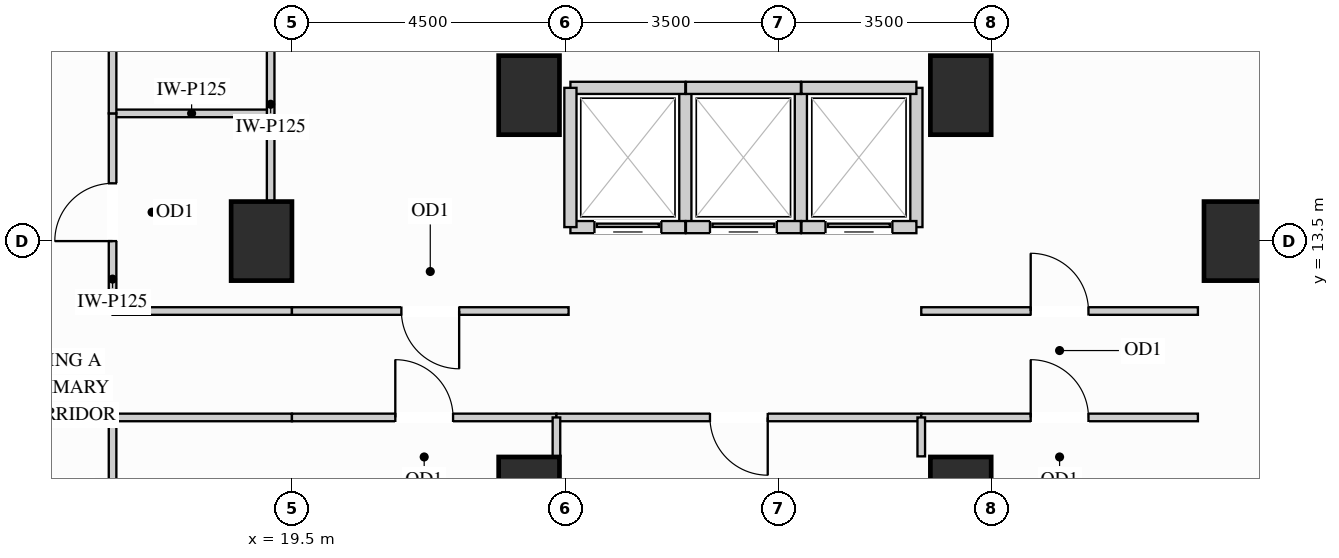
"""IFC4 building model, lengths in metres.
Left out: names, types, materials, properties, quantities, classifications, styles, units other than length and angle.
Written with IfcOpenShell. Run it as: python <this file> out.ifc"""

import sys

from ifc_helpers import new_model, si_unit, direction, frame, frame_2d, origin, origin_2d, place, context, subcontext, project, spatial, rectangle, extrude, source, transform, mapped, element, fill, save


model = new_model("IFC4")
c1 = context("Model", 3, precision=1e-05, world=origin(), true_north=direction((0.0, 1.0)))
c2 = subcontext(c1, "Body", "Model", "MODEL_VIEW")
j1 = project(units=[si_unit("LENGTHUNIT", "METRE"), si_unit("PLANEANGLEUNIT", "RADIAN")], contexts=[c1])
p1 = place(None, origin())
s1 = spatial("IfcSite", under=j1, at=p1, CompositionType="ELEMENT")
p2 = place(p1, origin())
s2 = spatial("IfcBuilding", under=s1, at=p2, CompositionType="ELEMENT")
p3 = place(p2, frame((0.0, 0.0, 29.7)))
s3 = spatial("IfcBuildingStorey", under=s2, at=p3, CompositionType="ELEMENT", Elevation=29.7)
m1 = source(origin(), c2, "Body", "SweptSolid", [
    extrude(rectangle(XDim=1.0, YDim=1.3, at=origin_2d()), origin(), (0.0, 0.0, 1.0), 3.38),
])
for number, where, z_axis, x_axis in (
    (1, (19.0, 13.5, 0.0), (0.0, 0.0, 1.0), (1.0, 0.0, 0.0)),
    (2, (35.0, 13.5, 0.0), (0.0, 0.0, 1.0), (1.0, 0.0, 0.0)),
    (3, (23.4, 15.9, 0.0), (0.0, 0.0, 1.0), (1.0, 0.0, 0.0)),
    (4, (23.4, 9.3, 0.0), (0.0, 0.0, 1.0), (1.0, 0.0, 0.0)),
    (5, (30.5, 15.9, 0.0), (0.0, 0.0, 1.0), (1.0, 0.0, 0.0)),
    (6, (30.5, 9.3, 0.0), (0.0, 0.0, 1.0), (1.0, 0.0, 0.0)),
):
    element("IfcColumn", number, at=place(p3, frame(where, z_axis=z_axis, x_axis=x_axis)), inside=s3, PredefinedType="COLUMN", context=c2, shape_type="MappedRepresentation", body=[
        mapped(m1, transform((0.0, 0.0, 0.0), x_axis=(1.0, 0.0, 0.0), y_axis=(0.0, 1.0, 0.0), z_axis=(0.0, 0.0, 1.0))),
    ])
m2 = source(origin(), c2, "Body", "SweptSolid", [
    extrude(rectangle(XDim=2.6, YDim=0.125, at=frame_2d((1.3, 0.0))), origin(), (0.0, 0.0, 1.0), 3.365),
])
p4 = place(p3, frame((16.55, 15.6, 0.0), z_axis=(0.0, 0.0, 1.0), x_axis=(1.0, 0.0, 0.0)))
e7 = element("IfcWall", 7, at=p4, inside=s3, PredefinedType="PARTITIONING", context=c2, shape_type="MappedRepresentation", body=[
    mapped(m2, transform((0.0, 0.0, 0.0), x_axis=(1.0, 0.0, 0.0), y_axis=(0.0, 1.0, 0.0), z_axis=(0.0, 0.0, 1.0))),
])
m3 = source(origin(), c2, "Body", "SweptSolid", [
    extrude(rectangle(XDim=3.18, YDim=0.125, at=frame_2d((1.59, 0.0))), origin(), (0.0, 0.0, 1.0), 2.67),
])
p5 = place(p3, frame((19.15, 14.16, 0.0), z_axis=(0.0, 0.0, 1.0), x_axis=(0.0, 1.0, 0.0)))
e8 = element("IfcWall", 8, at=p5, inside=s3, PredefinedType="PARTITIONING", context=c2, shape_type="MappedRepresentation", body=[
    mapped(m3, transform((0.0, 0.0, 0.0), x_axis=(1.0, 0.0, 0.0), y_axis=(0.0, 1.0, 0.0), z_axis=(0.0, 0.0, 1.0))),
])
p6 = place(p3, frame((16.55, 12.35, 0.0), z_axis=(0.0, 0.0, 1.0), x_axis=(0.0, 1.0, 0.0)))
e9 = element("IfcWall", 9, at=p6, inside=s3, PredefinedType="PARTITIONING", context=c2, shape_type="SweptSolid", body=[
    extrude(rectangle(XDim=3.25, YDim=0.125, at=frame_2d((1.625, 0.0))), origin(), (0.0, 0.0, 1.0), 3.365),
])
p7 = place(p6, frame((1.15, 0.0, 0.0)))
e10 = element("IfcOpeningElement", 10, at=p7, cuts=e9, PredefinedType="OPENING", context=c2, shape_type="SweptSolid", body=[
    extrude(rectangle(XDim=0.95, YDim=2.15, at=frame_2d((0.475, 1.075))), frame((0.0, 0.073, 0.0), z_axis=(0.0, -1.0, 0.0), x_axis=(1.0, 0.0, 0.0)), (0.0, 0.0, 1.0), 0.145),
])
p8 = place(p3, frame((16.55, 15.6, 0.0), z_axis=(0.0, 0.0, 1.0), x_axis=(0.0, 1.0, 0.0)))
e11 = element("IfcWall", 11, at=p8, inside=s3, PredefinedType="PARTITIONING", context=c2, shape_type="SweptSolid", body=[
    extrude(rectangle(XDim=7.75, YDim=0.125, at=frame_2d((3.875, 0.0))), origin(), (0.0, 0.0, 1.0), 3.365),
])
p9 = place(p8, frame((3.4, 0.0, 0.0)))
e12 = element("IfcOpeningElement", 12, at=p9, cuts=e11, PredefinedType="OPENING", context=c2, shape_type="SweptSolid", body=[
    extrude(rectangle(XDim=0.95, YDim=2.15, at=frame_2d((0.475, 1.075))), frame((0.0, 0.073, 0.0), z_axis=(0.0, -1.0, 0.0), x_axis=(1.0, 0.0, 0.0)), (0.0, 0.0, 1.0), 0.145),
])
p10 = place(p3, frame((16.55, 6.2, 0.0), z_axis=(0.0, 0.0, 1.0), x_axis=(0.0, 1.0, 0.0)))
e13 = element("IfcWall", 13, at=p10, inside=s3, PredefinedType="PARTITIONING", context=c2, shape_type="SweptSolid", body=[
    extrude(rectangle(XDim=4.4, YDim=0.125, at=frame_2d((2.2, 0.0))), origin(), (0.0, 0.0, 1.0), 3.365),
])
p11 = place(p10, frame((1.725, 0.0, 0.0)))
e14 = element("IfcOpeningElement", 14, at=p11, cuts=e13, PredefinedType="OPENING", context=c2, shape_type="SweptSolid", body=[
    extrude(rectangle(XDim=0.95, YDim=2.15, at=frame_2d((0.475, 1.075))), frame((0.0, 0.073, 0.0), z_axis=(0.0, -1.0, 0.0), x_axis=(1.0, 0.0, 0.0)), (0.0, 0.0, 1.0), 0.145),
])
p12 = place(p3, frame((29.85, 12.35, 0.0), z_axis=(0.0, 0.0, 1.0), x_axis=(1.0, 0.0, 0.0)))
e15 = element("IfcWall", 15, at=p12, inside=s3, PredefinedType="PARTITIONING", context=c2, shape_type="SweptSolid", body=[
    extrude(rectangle(XDim=4.55, YDim=0.125, at=frame_2d((2.275, 0.0))), origin(), (0.0, 0.0, 1.0), 3.365),
])
p13 = place(p12, frame((1.8, 0.0, 0.0)))
e16 = element("IfcOpeningElement", 16, at=p13, cuts=e15, PredefinedType="OPENING", context=c2, shape_type="SweptSolid", body=[
    extrude(rectangle(XDim=0.95, YDim=2.15, at=frame_2d((0.475, 1.075))), frame((0.0, 0.073, 0.0), z_axis=(0.0, -1.0, 0.0), x_axis=(1.0, 0.0, 0.0)), (0.0, 0.0, 1.0), 0.145),
])
m4 = source(origin(), c2, "Body", "SweptSolid", [
    extrude(rectangle(XDim=2.95, YDim=0.125, at=frame_2d((1.475, 0.0))), origin(), (0.0, 0.0, 1.0), 3.365),
])
p14 = place(p3, frame((16.55, 12.35, 0.0), z_axis=(0.0, 0.0, 1.0), x_axis=(1.0, 0.0, 0.0)))
e17 = element("IfcWall", 17, at=p14, inside=s3, PredefinedType="PARTITIONING", context=c2, shape_type="MappedRepresentation", body=[
    mapped(m4, transform((0.0, 0.0, 0.0), x_axis=(1.0, 0.0, 0.0), y_axis=(0.0, 1.0, 0.0), z_axis=(0.0, 0.0, 1.0))),
])
p15 = place(p3, frame((19.5, 12.35, 0.0), z_axis=(0.0, 0.0, 1.0), x_axis=(1.0, 0.0, 0.0)))
e18 = element("IfcWall", 18, at=p15, inside=s3, PredefinedType="PARTITIONING", context=c2, shape_type="SweptSolid", body=[
    extrude(rectangle(XDim=4.55, YDim=0.125, at=frame_2d((2.275, 0.0))), origin(), (0.0, 0.0, 1.0), 3.365),
])
p16 = place(p15, frame((1.8, 0.0, 0.0)))
e19 = element("IfcOpeningElement", 19, at=p16, cuts=e18, PredefinedType="OPENING", context=c2, shape_type="SweptSolid", body=[
    extrude(rectangle(XDim=0.95, YDim=2.15, at=frame_2d((0.475, 1.075))), frame((0.0, 0.073, 0.0), z_axis=(0.0, -1.0, 0.0), x_axis=(1.0, 0.0, 0.0)), (0.0, 0.0, 1.0), 0.145),
])
p17 = place(p3, frame((16.55, 10.6, 0.0), z_axis=(0.0, 0.0, 1.0), x_axis=(1.0, 0.0, 0.0)))
e20 = element("IfcWall", 20, at=p17, inside=s3, PredefinedType="PARTITIONING", context=c2, shape_type="MappedRepresentation", body=[
    mapped(m4, transform((0.0, 0.0, 0.0), x_axis=(1.0, 0.0, 0.0), y_axis=(0.0, 1.0, 0.0), z_axis=(0.0, 0.0, 1.0))),
])
p18 = place(p3, frame((19.5, 10.6, 0.0), z_axis=(0.0, 0.0, 1.0), x_axis=(1.0, 0.0, 0.0)))
e21 = element("IfcWall", 21, at=p18, inside=s3, PredefinedType="PARTITIONING", context=c2, shape_type="SweptSolid", body=[
    extrude(rectangle(XDim=4.35, YDim=0.125, at=frame_2d((2.175, 0.0))), origin(), (0.0, 0.0, 1.0), 3.365),
])
p19 = place(p18, frame((1.7, 0.0, 0.0)))
e22 = element("IfcOpeningElement", 22, at=p19, cuts=e21, PredefinedType="OPENING", context=c2, shape_type="SweptSolid", body=[
    extrude(rectangle(XDim=0.95, YDim=2.15, at=frame_2d((0.475, 1.075))), frame((0.0, 0.073, 0.0), z_axis=(0.0, -1.0, 0.0), x_axis=(1.0, 0.0, 0.0)), (0.0, 0.0, 1.0), 0.145),
])
p20 = place(p3, frame((23.85, 10.6, 0.0), z_axis=(0.0, 0.0, 1.0), x_axis=(1.0, 0.0, 0.0)))
e23 = element("IfcWall", 23, at=p20, inside=s3, PredefinedType="PARTITIONING", context=c2, shape_type="SweptSolid", body=[
    extrude(rectangle(XDim=6.0, YDim=0.125, at=frame_2d((3.0, 0.0))), origin(), (0.0, 0.0, 1.0), 3.365),
])
p21 = place(p20, frame((2.525, 0.0, 0.0)))
e24 = element("IfcOpeningElement", 24, at=p21, cuts=e23, PredefinedType="OPENING", context=c2, shape_type="SweptSolid", body=[
    extrude(rectangle(XDim=0.95, YDim=2.15, at=frame_2d((0.475, 1.075))), frame((0.0, 0.073, 0.0), z_axis=(0.0, -1.0, 0.0), x_axis=(1.0, 0.0, 0.0)), (0.0, 0.0, 1.0), 0.145),
])
p22 = place(p3, frame((29.85, 10.6, 0.0), z_axis=(0.0, 0.0, 1.0), x_axis=(1.0, 0.0, 0.0)))
e25 = element("IfcWall", 25, at=p22, inside=s3, PredefinedType="PARTITIONING", context=c2, shape_type="SweptSolid", body=[
    extrude(rectangle(XDim=4.55, YDim=0.125, at=frame_2d((2.275, 0.0))), origin(), (0.0, 0.0, 1.0), 3.365),
])
p23 = place(p22, frame((1.8, 0.0, 0.0)))
e26 = element("IfcOpeningElement", 26, at=p23, cuts=e25, PredefinedType="OPENING", context=c2, shape_type="SweptSolid", body=[
    extrude(rectangle(XDim=0.95, YDim=2.15, at=frame_2d((0.475, 1.075))), frame((0.0, 0.073, 0.0), z_axis=(0.0, -1.0, 0.0), x_axis=(1.0, 0.0, 0.0)), (0.0, 0.0, 1.0), 0.145),
])
m5 = source(origin(), c2, "Body", "SweptSolid", [
    extrude(rectangle(XDim=0.64, YDim=0.125, at=frame_2d((0.32, 0.0))), origin(), (0.0, 0.0, 1.0), 3.365),
])
for number, where, z_axis, x_axis in (
    (27, (23.85, 9.96, 0.0), (0.0, 0.0, 1.0), (0.0, 1.0, 0.0)),
    (28, (29.85, 9.96, 0.0), (0.0, 0.0, 1.0), (0.0, 1.0, 0.0)),
):
    element("IfcWall", number, at=place(p3, frame(where, z_axis=z_axis, x_axis=x_axis)), inside=s3, PredefinedType="PARTITIONING", context=c2, shape_type="MappedRepresentation", body=[
        mapped(m5, transform((0.0, 0.0, 0.0), x_axis=(1.0, 0.0, 0.0), y_axis=(0.0, 1.0, 0.0), z_axis=(0.0, 0.0, 1.0))),
    ])
m6 = source(origin(), c2, "Body", "SweptSolid", [
    extrude(rectangle(XDim=2.29, YDim=0.2, at=frame_2d((1.145, 0.0))), origin(), (0.0, 0.0, 1.0), 3.365),
])
p24 = place(p3, frame((25.97, 13.73, 0.0), z_axis=(0.0, 0.0, 1.0), x_axis=(0.0, 1.0, 0.0)))
e29 = element("IfcWall", 29, at=p24, inside=s3, PredefinedType="PARTITIONING", context=c2, shape_type="MappedRepresentation", body=[
    mapped(m6, transform((0.0, 0.0, 0.0), x_axis=(1.0, 0.0, 0.0), y_axis=(0.0, 1.0, 0.0), z_axis=(0.0, 0.0, 1.0))),
])
m7 = source(origin(), c2, "Body", "SweptSolid", [
    extrude(rectangle(XDim=1.89, YDim=0.2, at=frame_2d((0.945, 0.0))), origin(), (0.0, 0.0, 1.0), 2.67),
])
p25 = place(p3, frame((24.08, 16.02, 0.0), z_axis=(0.0, 0.0, 1.0), x_axis=(1.0, 0.0, 0.0)))
e30 = element("IfcWall", 30, at=p25, inside=s3, PredefinedType="PARTITIONING", context=c2, shape_type="MappedRepresentation", body=[
    mapped(m7, transform((0.0, 0.0, 0.0), x_axis=(1.0, 0.0, 0.0), y_axis=(0.0, 1.0, 0.0), z_axis=(0.0, 0.0, 1.0))),
])
p26 = place(p3, frame((24.08, 13.73, 0.0), z_axis=(0.0, 0.0, 1.0), x_axis=(1.0, 0.0, 0.0)))
e31 = element("IfcWall", 31, at=p26, inside=s3, PredefinedType="PARTITIONING", context=c2, shape_type="SweptSolid", body=[
    extrude(rectangle(XDim=1.89, YDim=0.2, at=frame_2d((0.945, 0.0))), origin(), (0.0, 0.0, 1.0), 2.446),
])
p27 = place(p26, frame((0.395, 0.0, 0.0)))
e32 = element("IfcOpeningElement", 32, at=p27, cuts=e31, PredefinedType="OPENING", context=c2, shape_type="SweptSolid", body=[
    extrude(rectangle(XDim=1.1, YDim=2.2, at=frame_2d((0.55, 1.1))), frame((0.0, 0.11, 0.0), z_axis=(0.0, -1.0, 0.0), x_axis=(1.0, 0.0, 0.0)), (0.0, 0.0, 1.0), 0.22),
])
for number, where, z_axis, x_axis in (
    (33, (24.08, 13.73, 0.0), (0.0, 0.0, 1.0), (0.0, 1.0, 0.0)),
    (34, (27.87, 13.73, 0.0), (0.0, 0.0, 1.0), (0.0, 1.0, 0.0)),
):
    element("IfcWall", number, at=place(p3, frame(where, z_axis=z_axis, x_axis=x_axis)), inside=s3, PredefinedType="PARTITIONING", context=c2, shape_type="MappedRepresentation", body=[
        mapped(m6, transform((0.0, 0.0, 0.0), x_axis=(1.0, 0.0, 0.0), y_axis=(0.0, 1.0, 0.0), z_axis=(0.0, 0.0, 1.0))),
    ])
m8 = source(origin(), c2, "Body", "SweptSolid", [
    extrude(rectangle(XDim=1.89, YDim=0.2, at=frame_2d((0.945, 0.0))), origin(), (0.0, 0.0, 1.0), 2.67),
])
p28 = place(p3, frame((25.98, 16.02, 0.0), z_axis=(0.0, 0.0, 1.0), x_axis=(1.0, 0.0, 0.0)))
e35 = element("IfcWall", 35, at=p28, inside=s3, PredefinedType="PARTITIONING", context=c2, shape_type="MappedRepresentation", body=[
    mapped(m8, transform((0.0, 0.0, 0.0), x_axis=(1.0, 0.0, 0.0), y_axis=(0.0, 1.0, 0.0), z_axis=(0.0, 0.0, 1.0))),
])
p29 = place(p3, frame((25.98, 13.73, 0.0), z_axis=(0.0, 0.0, 1.0), x_axis=(1.0, 0.0, 0.0)))
e36 = element("IfcWall", 36, at=p29, inside=s3, PredefinedType="PARTITIONING", context=c2, shape_type="SweptSolid", body=[
    extrude(rectangle(XDim=1.89, YDim=0.2, at=frame_2d((0.945, 0.0))), origin(), (0.0, 0.0, 1.0), 2.446),
])
p30 = place(p29, frame((0.395, 0.0, 0.0)))
e37 = element("IfcOpeningElement", 37, at=p30, cuts=e36, PredefinedType="OPENING", context=c2, shape_type="SweptSolid", body=[
    extrude(rectangle(XDim=1.1, YDim=2.2, at=frame_2d((0.55, 1.1))), frame((0.0, 0.11, 0.0), z_axis=(0.0, -1.0, 0.0), x_axis=(1.0, 0.0, 0.0)), (0.0, 0.0, 1.0), 0.22),
])
p31 = place(p3, frame((29.77, 13.73, 0.0), z_axis=(0.0, 0.0, 1.0), x_axis=(0.0, 1.0, 0.0)))
e38 = element("IfcWall", 38, at=p31, inside=s3, PredefinedType="PARTITIONING", context=c2, shape_type="MappedRepresentation", body=[
    mapped(m6, transform((0.0, 0.0, 0.0), x_axis=(1.0, 0.0, 0.0), y_axis=(0.0, 1.0, 0.0), z_axis=(0.0, 0.0, 1.0))),
])
p32 = place(p3, frame((27.88, 16.02, 0.0), z_axis=(0.0, 0.0, 1.0), x_axis=(1.0, 0.0, 0.0)))
e39 = element("IfcWall", 39, at=p32, inside=s3, PredefinedType="PARTITIONING", context=c2, shape_type="MappedRepresentation", body=[
    mapped(m8, transform((0.0, 0.0, 0.0), x_axis=(1.0, 0.0, 0.0), y_axis=(0.0, 1.0, 0.0), z_axis=(0.0, 0.0, 1.0))),
])
p33 = place(p3, frame((27.88, 13.73, 0.0), z_axis=(0.0, 0.0, 1.0), x_axis=(1.0, 0.0, 0.0)))
e40 = element("IfcWall", 40, at=p33, inside=s3, PredefinedType="PARTITIONING", context=c2, shape_type="SweptSolid", body=[
    extrude(rectangle(XDim=1.89, YDim=0.2, at=frame_2d((0.945, 0.0))), origin(), (0.0, 0.0, 1.0), 2.446),
])
p34 = place(p33, frame((0.395, 0.0, 0.0)))
e41 = element("IfcOpeningElement", 41, at=p34, cuts=e40, PredefinedType="OPENING", context=c2, shape_type="SweptSolid", body=[
    extrude(rectangle(XDim=1.1, YDim=2.2, at=frame_2d((0.55, 1.1))), frame((0.0, 0.11, 0.0), z_axis=(0.0, -1.0, 0.0), x_axis=(1.0, 0.0, 0.0)), (0.0, 0.0, 1.0), 0.22),
])
m9 = source(origin(), c2, "Body", "SweptSolid", [
    extrude(rectangle(XDim=1.1, YDim=2.2, at=frame_2d((0.55, 1.1))), frame((0.0, 0.025, 0.0), z_axis=(0.0, -1.0, 0.0), x_axis=(1.0, 0.0, 0.0)), (0.0, 0.0, 1.0), 0.05),
])
p35 = place(p27, origin())
e42 = element("IfcDoor", 42, at=p35, inside=s3, OperationType="SLIDING_TO_LEFT", PredefinedType="DOOR", context=c2, shape_type="MappedRepresentation", body=[
    mapped(m9, transform((0.0, 0.0, 0.0), x_axis=(1.0, 0.0, 0.0), y_axis=(0.0, 1.0, 0.0), z_axis=(0.0, 0.0, 1.0))),
])
fill(e32, e42)
p36 = place(p30, origin())
e43 = element("IfcDoor", 43, at=p36, inside=s3, OperationType="SLIDING_TO_LEFT", PredefinedType="DOOR", context=c2, shape_type="MappedRepresentation", body=[
    mapped(m9, transform((0.0, 0.0, 0.0), x_axis=(1.0, 0.0, 0.0), y_axis=(0.0, 1.0, 0.0), z_axis=(0.0, 0.0, 1.0))),
])
fill(e37, e43)
p37 = place(p34, origin())
e44 = element("IfcDoor", 44, at=p37, inside=s3, OperationType="SLIDING_TO_LEFT", PredefinedType="DOOR", context=c2, shape_type="MappedRepresentation", body=[
    mapped(m9, transform((0.0, 0.0, 0.0), x_axis=(1.0, 0.0, 0.0), y_axis=(0.0, 1.0, 0.0), z_axis=(0.0, 0.0, 1.0))),
])
fill(e41, e44)
m10 = source(origin(), c2, "Body", "SweptSolid", [
    extrude(rectangle(XDim=0.95, YDim=2.15, at=frame_2d((0.475, 1.075))), frame((0.0, 0.025, 0.0), z_axis=(0.0, -1.0, 0.0), x_axis=(1.0, 0.0, 0.0)), (0.0, 0.0, 1.0), 0.05),
])
p38 = place(p7, origin())
e45 = element("IfcDoor", 45, at=p38, inside=s3, OperationType="SINGLE_SWING_LEFT", PredefinedType="DOOR", context=c2, shape_type="MappedRepresentation", body=[
    mapped(m10, transform((0.0, 0.0, 0.0), x_axis=(1.0, 0.0, 0.0), y_axis=(0.0, 1.0, 0.0), z_axis=(0.0, 0.0, 1.0))),
])
fill(e10, e45)
p39 = place(p16, origin())
e46 = element("IfcDoor", 46, at=p39, inside=s3, OperationType="SINGLE_SWING_RIGHT", PredefinedType="DOOR", context=c2, shape_type="MappedRepresentation", body=[
    mapped(m10, transform((0.0, 0.0, 0.0), x_axis=(1.0, 0.0, 0.0), y_axis=(0.0, 1.0, 0.0), z_axis=(0.0, 0.0, 1.0))),
])
fill(e19, e46)
p40 = place(p13, origin())
e47 = element("IfcDoor", 47, at=p40, inside=s3, OperationType="SINGLE_SWING_LEFT", PredefinedType="DOOR", context=c2, shape_type="MappedRepresentation", body=[
    mapped(m10, transform((0.0, 0.0, 0.0), x_axis=(1.0, 0.0, 0.0), y_axis=(0.0, 1.0, 0.0), z_axis=(0.0, 0.0, 1.0))),
])
fill(e16, e47)
p41 = place(p19, origin())
e48 = element("IfcDoor", 48, at=p41, inside=s3, OperationType="SINGLE_SWING_LEFT", PredefinedType="DOOR", context=c2, shape_type="MappedRepresentation", body=[
    mapped(m10, transform((0.0, 0.0, 0.0), x_axis=(1.0, 0.0, 0.0), y_axis=(0.0, 1.0, 0.0), z_axis=(0.0, 0.0, 1.0))),
])
fill(e22, e48)
p42 = place(p21, origin())
e49 = element("IfcDoor", 49, at=p42, inside=s3, OperationType="SINGLE_SWING_RIGHT", PredefinedType="DOOR", context=c2, shape_type="MappedRepresentation", body=[
    mapped(m10, transform((0.0, 0.0, 0.0), x_axis=(1.0, 0.0, 0.0), y_axis=(0.0, 1.0, 0.0), z_axis=(0.0, 0.0, 1.0))),
])
fill(e24, e49)
p43 = place(p23, origin())
e50 = element("IfcDoor", 50, at=p43, inside=s3, OperationType="SINGLE_SWING_LEFT", PredefinedType="DOOR", context=c2, shape_type="MappedRepresentation", body=[
    mapped(m10, transform((0.0, 0.0, 0.0), x_axis=(1.0, 0.0, 0.0), y_axis=(0.0, 1.0, 0.0), z_axis=(0.0, 0.0, 1.0))),
])
fill(e26, e50)
save(model, sys.argv[1])
